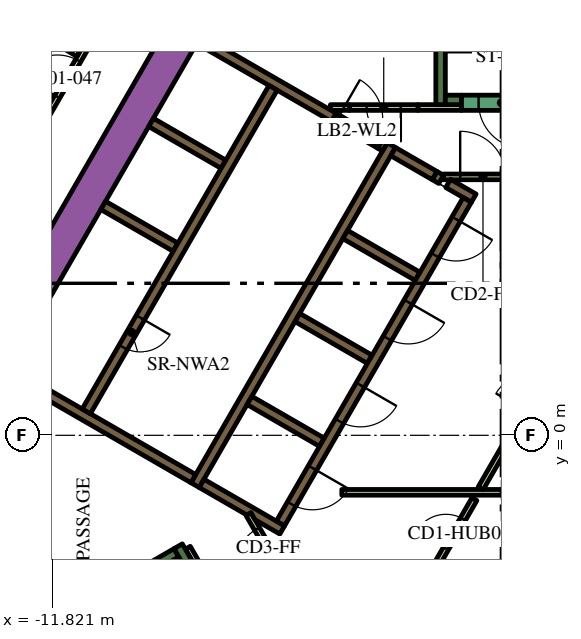
"""IFC4 building model, lengths in metres.
Left out: names, types, materials, properties, quantities, classifications, styles, units other than length and angle.
Written with IfcOpenShell. Run it as: python <this file> out.ifc"""

import sys

from ifc_helpers import new_model, si_unit, direction, frame, frame_2d, origin, place, context, subcontext, project, spatial, polyline, rectangle, outline, extrude, element, fill, save


model = new_model("IFC4")
c1 = context("Model", 3, precision=1e-05, world=origin(), true_north=direction((0.0, 1.0)))
c2 = subcontext(c1, "Body", "Model", "MODEL_VIEW")
j1 = project(units=[si_unit("LENGTHUNIT", "METRE"), si_unit("PLANEANGLEUNIT", "RADIAN")], contexts=[c1])
p1 = place(None, origin())
s1 = spatial("IfcSite", under=j1, at=p1, CompositionType="ELEMENT")
p2 = place(p1, origin())
s2 = spatial("IfcBuilding", under=s1, at=p2, CompositionType="ELEMENT")
p3 = place(p2, frame((0.0, 0.0, 27.6)))
s3 = spatial("IfcBuildingStorey", under=s2, at=p3, CompositionType="ELEMENT", Elevation=27.6)
p4 = place(p3, frame((-15.36, -1.503, 0.0), z_axis=(0.0, 0.0, 1.0), x_axis=(0.50000389221, 0.866023156604, 0.0)))
e1 = element("IfcWall", 1, at=p4, inside=s3, PredefinedType="SOLIDWALL", context=c2, shape_type="SweptSolid", body=[
    extrude(rectangle(XDim=21.0, YDim=0.9, at=frame_2d((10.5, 0.0))), origin(), (0.0, 0.0, 1.0), 3.9),
])
p5 = place(p3, frame((-1.6, 8.7, 0.0), z_axis=(0.0, 0.0, 1.0), x_axis=(0.0, 1.0, 0.0)))
e2 = element("IfcWall", 2, at=p5, inside=s3, PredefinedType="SOLIDWALL", context=c2, shape_type="SweptSolid", body=[
    extrude(rectangle(XDim=7.05, YDim=0.25, at=frame_2d((3.525, 0.0))), origin(), (0.0, 0.0, 1.0), 3.9),
])
p6 = place(p3, frame((-1.475, 8.825, 0.0), z_axis=(0.0, 0.0, 1.0), x_axis=(1.0, 0.0, 0.0)))
e3 = element("IfcWall", 3, at=p6, inside=s3, PredefinedType="SOLIDWALL", context=c2, shape_type="SweptSolid", body=[
    extrude(rectangle(XDim=0.425, YDim=0.25, at=frame_2d((0.212, 0.0))), origin(), (0.0, 0.0, 1.0), 3.9),
])
p7 = place(p3, frame((-14.44, -6.49, 0.0), z_axis=(0.0, 0.0, 1.0), x_axis=(0.866022966069, 0.500004222222, 0.0)))
e4 = element("IfcWall", 4, at=p7, inside=s3, PredefinedType="SOLIDWALL", context=c2, shape_type="SweptSolid", body=[
    extrude(rectangle(XDim=6.8, YDim=0.25, at=frame_2d((3.4, 0.0))), origin(), (0.0, 0.0, 1.0), 3.9),
])
p8 = place(p3, frame((-8.168, -3.503, 0.0), z_axis=(0.0, 0.0, 1.0), x_axis=(-0.499952099219, 0.866053057547, 0.0)))
e5 = element("IfcWall", 5, at=p8, inside=s3, PredefinedType="SOLIDWALL", context=c2, shape_type="SweptSolid", body=[
    extrude(rectangle(XDim=0.675, YDim=0.25, at=frame_2d((0.337, 0.0))), origin(), (0.0, 0.0, 1.0), 3.9),
])
p9 = place(p3, frame((-8.06, -1.311, 0.0), z_axis=(0.0, 0.0, 1.0), x_axis=(0.50000273126, 0.866023826885, 0.0)))
e6 = element("IfcWall", 6, at=p9, inside=s3, PredefinedType="SOLIDWALL", context=c2, shape_type="SweptSolid", body=[
    extrude(rectangle(XDim=10.33, YDim=0.25, at=frame_2d((5.165, 0.0))), origin(), (0.0, 0.0, 1.0), 3.9),
])
p10 = place(p3, frame((-1.758, 6.835, 0.0), z_axis=(0.0, 0.0, 1.0), x_axis=(0.865982457891, -0.500074377092, 0.0)))
e7 = element("IfcWall", 7, at=p10, inside=s3, PredefinedType="SOLIDWALL", context=c2, shape_type="SweptSolid", body=[
    extrude(rectangle(XDim=0.2, YDim=0.25, at=frame_2d((0.1, 0.0))), origin(), (0.0, 0.0, 1.0), 3.9),
])
p11 = place(p3, frame((-1.76, 6.836, 0.0), z_axis=(0.0, 0.0, 1.0), x_axis=(-0.865952863304, 0.500125622755, 0.0)))
e8 = element("IfcWall", 8, at=p11, inside=s3, PredefinedType="SOLIDWALL", context=c2, shape_type="SweptSolid", body=[
    extrude(rectangle(XDim=1.258, YDim=0.25, at=frame_2d((0.629, 0.0))), origin(), (0.0, 0.0, 1.0), 3.9),
])
p12 = place(p3, frame((-0.728, 6.24, 0.0), z_axis=(0.0, 0.0, 1.0), x_axis=(-0.865955664968, 0.500120771724, 0.0)))
e9 = element("IfcWall", 9, at=p12, inside=s3, PredefinedType="SOLIDWALL", context=c2, shape_type="SweptSolid", body=[
    extrude(rectangle(XDim=0.778, YDim=0.25, at=frame_2d((0.389, 0.0))), origin(), (0.0, 0.0, 1.0), 3.9),
])
for number, where, z_axis, x_axis in (
    (10, (-2.204, 4.182, 0.0), (0.0, 0.0, 1.0), (-0.866, 0.5, 0.0)),
    (11, (-5.369, 3.1, 0.0), (0.0, 0.0, 1.0), (0.866, -0.5, 0.0)),
    (12, (-4.724, -0.182, 0.0), (0.0, 0.0, 1.0), (-0.866, 0.5, 0.0)),
):
    element("IfcWall", number, at=place(p3, frame(where, z_axis=z_axis, x_axis=x_axis)), inside=s3, PredefinedType="SOLIDWALL", context=c2, shape_type="SweptSolid", body=[
        extrude(rectangle(XDim=2.2, YDim=0.25, at=frame_2d((1.1, 0.0))), origin(), (0.0, 0.0, 1.0), 3.9),
    ])
p13 = place(p3, origin())
e13 = element("IfcWall", 13, at=p13, inside=s3, PredefinedType="SOLIDWALL", context=c2, shape_type="SweptSolid", body=[
    extrude(outline(polyline([(-5.922, -2.257), (-5.922, -2.257), (-5.705, -2.382), (-5.83, -2.598), (-6.483, -2.221), (-6.591, -2.033), (-6.591, -2.033), (-6.7, -2.096), (-7.952, -1.373), (-7.827, -1.156), (-5.922, -2.257)])), origin(), (0.0, 0.0, 1.0), 3.9),
])
p14 = place(p3, frame((-8.106, -1.14, 0.0), z_axis=(0.0, 0.0, 1.0), x_axis=(-0.866000643155, 0.500042884217, 0.0)))
e14 = element("IfcWall", 14, at=p14, inside=s3, PredefinedType="SOLIDWALL", context=c2, shape_type="SweptSolid", body=[
    extrude(rectangle(XDim=5.65, YDim=0.25, at=frame_2d((2.825, 0.0))), origin(), (0.0, 0.0, 1.0), 3.9),
])
e15 = element("IfcWall", 15, at=p13, inside=s3, PredefinedType="SOLIDWALL", context=c2, shape_type="SweptSolid", body=[
    extrude(outline(polyline([(-3.128, 7.481), (-3.259, 7.557), (-3.134, 7.773), (-3.003, 7.698), (-3.128, 7.481)])), origin(), (0.0, 0.0, 1.0), 3.9),
])
for number, where, z_axis, x_axis in (
    (16, (-8.574, 4.95, 0.0), (0.0, 0.0, 1.0), (-0.866, 0.5, 0.0)),
    (17, (-7.314, 7.132, 0.0), (0.0, 0.0, 1.0), (-0.866, 0.5, 0.0)),
):
    element("IfcWall", number, at=place(p3, frame(where, z_axis=z_axis, x_axis=x_axis)), inside=s3, PredefinedType="SOLIDWALL", context=c2, shape_type="SweptSolid", body=[
        extrude(rectangle(XDim=2.2, YDim=0.25, at=frame_2d((1.1, 0.0))), origin(), (0.0, 0.0, 1.0), 3.9),
    ])
p15 = place(p3, frame((-7.959, 10.415, 0.0), z_axis=(0.0, 0.0, 1.0), x_axis=(0.866020958405, -0.500007699544, 0.0)))
e18 = element("IfcWall", 18, at=p15, inside=s3, PredefinedType="SOLIDWALL", context=c2, shape_type="SweptSolid", body=[
    extrude(rectangle(XDim=4.1, YDim=0.25, at=frame_2d((2.05, 0.0))), origin(), (0.0, 0.0, 1.0), 3.9),
])
p16 = place(p3, frame((-8.252, -2.958, 0.0), z_axis=(0.0, 0.0, 1.0), x_axis=(0.500174715838, -0.865924508047, 0.0)))
e19 = element("IfcWall", 19, at=p16, inside=s3, PredefinedType="PARTITIONING", context=c2, shape_type="SweptSolid", body=[
    extrude(rectangle(XDim=0.514, YDim=0.15, at=frame_2d((0.257, 0.0))), origin(), (0.0, 0.0, 1.0), 2.75),
])
p17 = place(p3, frame((-3.997, 8.625, 0.0), z_axis=(0.0, 0.0, 1.0), x_axis=(-1.0, 0.0, 0.0)))
e20 = element("IfcWall", 20, at=p17, inside=s3, PredefinedType="PARTITIONING", context=c2, shape_type="SweptSolid", body=[
    extrude(rectangle(XDim=0.502, YDim=0.15, at=frame_2d((0.251, 0.0))), origin(), (0.0, 0.0, 1.0), 2.75),
])
p18 = place(p3, frame((-2.196, 8.625, 0.0), z_axis=(0.0, 0.0, 1.0), x_axis=(1.0, 0.0, 0.0)))
e21 = element("IfcWall", 21, at=p18, inside=s3, PredefinedType="PARTITIONING", context=c2, shape_type="SweptSolid", body=[
    extrude(rectangle(XDim=1.146, YDim=0.15, at=frame_2d((0.573, 0.0))), origin(), (0.0, 0.0, 1.0), 2.75),
])
p19 = place(p3, frame((-4.2, -1.5, 0.0), z_axis=(0.0, 0.0, 1.0), x_axis=(1.0, 0.0, 0.0)))
e22 = element("IfcWall", 22, at=p19, inside=s3, PredefinedType="PARTITIONING", context=c2, shape_type="SweptSolid", body=[
    extrude(rectangle(XDim=9.359, YDim=0.15, at=frame_2d((4.68, 0.0))), origin(), (0.0, 0.0, 1.0), 2.75),
])
p20 = place(p3, frame((-0.544, -1.393, 0.0), z_axis=(0.0, 0.0, 1.0), x_axis=(0.499928740635, 0.866066541489, 0.0)))
e23 = element("IfcWall", 23, at=p20, inside=s3, PredefinedType="PARTITIONING", context=c2, shape_type="SweptSolid", body=[
    extrude(rectangle(XDim=1.912, YDim=0.15, at=frame_2d((0.956, 0.0))), origin(), (0.0, 0.0, 1.0), 2.75),
])
p21 = place(p3, frame((-6.008, 9.144, 0.0), z_axis=(0.0, 0.0, 1.0), x_axis=(-0.500006956611, -0.866021387346, 0.0)))
e24 = element("IfcWall", 24, at=p21, inside=s3, PredefinedType="SOLIDWALL", context=c2, shape_type="SweptSolid", body=[
    extrude(rectangle(XDim=9.83, YDim=0.25, at=frame_2d((4.915, 0.0))), origin(), (0.0, 0.0, 1.0), 3.9),
])
p22 = place(p21, frame((6.985, 0.0, 0.0)))
e25 = element("IfcOpeningElement", 25, at=p22, cuts=e24, PredefinedType="OPENING", context=c2, shape_type="SweptSolid", body=[
    extrude(rectangle(XDim=0.9, YDim=2.1, at=frame_2d((0.45, 1.05))), frame((0.0, 0.135, 0.0), z_axis=(0.0, -1.0, 0.0), x_axis=(1.0, 0.0, 0.0)), (0.0, 0.0, 1.0), 0.27),
])
p23 = place(p3, frame((-0.898, 6.194, 0.0), z_axis=(0.0, 0.0, 1.0), x_axis=(-0.499996202215, -0.866027596426, 0.0)))
e26 = element("IfcWall", 26, at=p23, inside=s3, PredefinedType="SOLIDWALL", context=c2, shape_type="SweptSolid", body=[
    extrude(rectangle(XDim=9.83, YDim=0.25, at=frame_2d((4.915, 0.0))), origin(), (0.0, 0.0, 1.0), 3.9),
])
p24 = place(p23, frame((0.585, 0.0, 0.0)))
e27 = element("IfcOpeningElement", 27, at=p24, cuts=e26, PredefinedType="OPENING", context=c2, shape_type="SweptSolid", body=[
    extrude(rectangle(XDim=1.1, YDim=2.1, at=frame_2d((0.55, 1.05))), frame((0.0, 0.135, 0.0), z_axis=(0.0, -1.0, 0.0), x_axis=(1.0, 0.0, 0.0)), (0.0, 0.0, 1.0), 0.27),
])
p25 = place(p23, frame((3.105, 0.0, 0.0)))
e28 = element("IfcOpeningElement", 28, at=p25, cuts=e26, PredefinedType="OPENING", context=c2, shape_type="SweptSolid", body=[
    extrude(rectangle(XDim=1.1, YDim=2.1, at=frame_2d((0.55, 1.05))), frame((0.0, 0.135, 0.0), z_axis=(0.0, -1.0, 0.0), x_axis=(1.0, 0.0, 0.0)), (0.0, 0.0, 1.0), 0.27),
])
p26 = place(p23, frame((5.625, 0.0, 0.0)))
e29 = element("IfcOpeningElement", 29, at=p26, cuts=e26, PredefinedType="OPENING", context=c2, shape_type="SweptSolid", body=[
    extrude(rectangle(XDim=1.1, YDim=2.1, at=frame_2d((0.55, 1.05))), frame((0.0, 0.135, 0.0), z_axis=(0.0, -1.0, 0.0), x_axis=(1.0, 0.0, 0.0)), (0.0, 0.0, 1.0), 0.27),
])
p27 = place(p23, frame((8.145, 0.0, 0.0)))
e30 = element("IfcOpeningElement", 30, at=p27, cuts=e26, PredefinedType="OPENING", context=c2, shape_type="SweptSolid", body=[
    extrude(rectangle(XDim=1.1, YDim=2.1, at=frame_2d((0.55, 1.05))), frame((0.0, 0.135, 0.0), z_axis=(0.0, -1.0, 0.0), x_axis=(1.0, 0.0, 0.0)), (0.0, 0.0, 1.0), 0.27),
])
p28 = place(p3, frame((1.05, 8.75, 0.0), z_axis=(0.0, 0.0, 1.0), x_axis=(-1.0, 0.0, 0.0)))
e31 = element("IfcWall", 31, at=p28, inside=s3, PredefinedType="SOLIDWALL", context=c2, shape_type="SweptSolid", body=[
    extrude(rectangle(XDim=2.1, YDim=0.4, at=frame_2d((1.05, 0.0))), origin(), (0.0, 0.0, 1.0), 3.9),
])
p29 = place(p28, frame((0.45, 0.0, 0.0)))
e32 = element("IfcOpeningElement", 32, at=p29, cuts=e31, PredefinedType="OPENING", context=c2, shape_type="SweptSolid", body=[
    extrude(rectangle(XDim=1.2, YDim=2.1, at=frame_2d((0.6, 1.05))), frame((0.0, 0.21, 0.0), z_axis=(0.0, -1.0, 0.0), x_axis=(1.0, 0.0, 0.0)), (0.0, 0.0, 1.0), 0.42),
])
p30 = place(p3, frame((-2.196, 8.625, 0.0), z_axis=(0.0, 0.0, 1.0), x_axis=(-1.0, 0.0, 0.0)))
e33 = element("IfcWall", 33, at=p30, inside=s3, PredefinedType="PARTITIONING", context=c2, shape_type="SweptSolid", body=[
    extrude(rectangle(XDim=1.8, YDim=0.15, at=frame_2d((0.9, 0.0))), origin(), (0.0, 0.0, 1.0), 2.75),
])
p31 = place(p30, frame((0.45, 0.0, 0.0)))
e34 = element("IfcOpeningElement", 34, at=p31, cuts=e33, PredefinedType="OPENING", context=c2, shape_type="SweptSolid", body=[
    extrude(rectangle(XDim=0.9, YDim=2.1, at=frame_2d((0.45, 1.05))), frame((0.0, 0.085, 0.0), z_axis=(0.0, -1.0, 0.0), x_axis=(1.0, 0.0, 0.0)), (0.0, 0.0, 1.0), 0.17),
])
p32 = place(p3, frame((-1.76, -3.498, 0.0), z_axis=(0.0, 0.0, 1.0), x_axis=(0.499977374825, 0.866038466041, 0.0)))
e35 = element("IfcWall", 35, at=p32, inside=s3, PredefinedType="PARTITIONING", context=c2, shape_type="SweptSolid", body=[
    extrude(rectangle(XDim=2.1, YDim=0.15, at=frame_2d((1.05, 0.0))), origin(), (0.0, 0.0, 1.0), 2.75),
])
p33 = place(p32, frame((0.6, 0.0, 0.0)))
e36 = element("IfcOpeningElement", 36, at=p33, cuts=e35, PredefinedType="OPENING", context=c2, shape_type="SweptSolid", body=[
    extrude(rectangle(XDim=0.9, YDim=2.1, at=frame_2d((0.45, 1.05))), frame((0.0, 0.085, 0.0), z_axis=(0.0, -1.0, 0.0), x_axis=(1.0, 0.0, 0.0)), (0.0, 0.0, 1.0), 0.17),
])
p34 = place(p3, frame((-1.534, 6.8, 0.0), z_axis=(0.0, 0.0, 1.0), x_axis=(1.0, 0.0, 0.0)))
e37 = element("IfcWall", 37, at=p34, inside=s3, PredefinedType="PARTITIONING", context=c2, shape_type="SweptSolid", body=[
    extrude(rectangle(XDim=2.1, YDim=0.15, at=frame_2d((1.05, 0.0))), origin(), (0.0, 0.0, 1.0), 2.75),
])
p35 = place(p34, frame((0.45, 0.0, 0.0)))
e38 = element("IfcOpeningElement", 38, at=p35, cuts=e37, PredefinedType="OPENING", context=c2, shape_type="SweptSolid", body=[
    extrude(rectangle(XDim=1.2, YDim=2.1, at=frame_2d((0.6, 1.05))), frame((0.0, 0.085, 0.0), z_axis=(0.0, -1.0, 0.0), x_axis=(1.0, 0.0, 0.0)), (0.0, 0.0, 1.0), 0.17),
])
p36 = place(p3, frame((-5.606, -3.89, 0.0), z_axis=(0.0, 0.0, 1.0), x_axis=(-0.500027713859, 0.866009402589, 0.0)))
e39 = element("IfcWall", 39, at=p36, inside=s3, PredefinedType="PARTITIONING", context=c2, shape_type="SweptSolid", body=[
    extrude(rectangle(XDim=2.1, YDim=0.15, at=frame_2d((1.05, 0.0))), origin(), (0.0, 0.0, 1.0), 2.75),
])
p37 = place(p36, frame((0.45, 0.0, 0.0)))
e40 = element("IfcOpeningElement", 40, at=p37, cuts=e39, PredefinedType="OPENING", context=c2, shape_type="SweptSolid", body=[
    extrude(rectangle(XDim=1.2, YDim=2.1, at=frame_2d((0.6, 1.05))), frame((0.0, 0.085, 0.0), z_axis=(0.0, -1.0, 0.0), x_axis=(1.0, 0.0, 0.0)), (0.0, 0.0, 1.0), 0.17),
])
p38 = place(p3, frame((-4.409, 8.365, 0.0), z_axis=(0.0, 0.0, 1.0), x_axis=(0.866034573852, -0.49998411664, 0.0)))
e41 = element("IfcWall", 41, at=p38, inside=s3, PredefinedType="SOLIDWALL", context=c2, shape_type="SweptSolid", body=[
    extrude(rectangle(XDim=1.4, YDim=0.25, at=frame_2d((0.7, 0.0))), origin(), (0.0, 0.0, 1.0), 3.9),
])
p39 = place(p38, frame((0.1, 0.0, 0.0)))
e42 = element("IfcOpeningElement", 42, at=p39, cuts=e41, PredefinedType="OPENING", context=c2, shape_type="SweptSolid", body=[
    extrude(rectangle(XDim=1.2, YDim=2.1, at=frame_2d((0.6, 1.05))), frame((0.0, 0.135, 0.0), z_axis=(0.0, -1.0, 0.0), x_axis=(1.0, 0.0, 0.0)), (0.0, 0.0, 1.0), 0.27),
])
p40 = place(p3, frame((-19.081, -3.9, 0.0), z_axis=(0.0, 0.0, 1.0), x_axis=(0.499998313975, 0.866026377209, 0.0)))
e43 = element("IfcWall", 43, at=p40, inside=s3, PredefinedType="PARTITIONING", context=c2, shape_type="SweptSolid", body=[
    extrude(rectangle(XDim=25.766, YDim=0.15, at=frame_2d((12.883, 0.0))), origin(), (0.0, 0.0, 1.0), 2.75),
])
p41 = place(p40, frame((24.586, 0.0, 0.0)))
e44 = element("IfcOpeningElement", 44, at=p41, cuts=e43, PredefinedType="OPENING", context=c2, shape_type="SweptSolid", body=[
    extrude(rectangle(XDim=1.0, YDim=2.1, at=frame_2d((0.5, 1.05))), frame((0.0, 0.085, 0.0), z_axis=(0.0, -1.0, 0.0), x_axis=(1.0, 0.0, 0.0)), (0.0, 0.0, 1.0), 0.17),
])
p42 = place(p40, frame((16.196, 0.0, 0.0)))
e45 = element("IfcOpeningElement", 45, at=p42, cuts=e43, PredefinedType="OPENING", context=c2, shape_type="SweptSolid", body=[
    extrude(rectangle(XDim=1.0, YDim=2.1, at=frame_2d((0.5, 1.05))), frame((0.0, 0.085, 0.0), z_axis=(0.0, -1.0, 0.0), x_axis=(1.0, 0.0, 0.0)), (0.0, 0.0, 1.0), 0.17),
])
p43 = place(p40, frame((14.789, 0.0, 0.0)))
e46 = element("IfcOpeningElement", 46, at=p43, cuts=e43, PredefinedType="OPENING", context=c2, shape_type="SweptSolid", body=[
    extrude(rectangle(XDim=1.1, YDim=2.1, at=frame_2d((0.55, 1.05))), frame((0.0, 0.085, 0.0), z_axis=(0.0, -1.0, 0.0), x_axis=(1.0, 0.0, 0.0)), (0.0, 0.0, 1.0), 0.17),
])
p44 = place(p40, frame((3.698, 0.0, 0.0)))
e47 = element("IfcOpeningElement", 47, at=p44, cuts=e43, PredefinedType="OPENING", context=c2, shape_type="SweptSolid", body=[
    extrude(rectangle(XDim=1.0, YDim=2.1, at=frame_2d((0.5, 1.05))), frame((0.0, 0.085, 0.0), z_axis=(0.0, -1.0, 0.0), x_axis=(1.0, 0.0, 0.0)), (0.0, 0.0, 1.0), 0.17),
])
p45 = place(p40, frame((1.531, 0.0, 0.0)))
e48 = element("IfcOpeningElement", 48, at=p45, cuts=e43, PredefinedType="OPENING", context=c2, shape_type="SweptSolid", body=[
    extrude(rectangle(XDim=0.9, YDim=2.1, at=frame_2d((0.45, 1.05))), frame((0.0, 0.085, 0.0), z_axis=(0.0, -1.0, 0.0), x_axis=(1.0, 0.0, 0.0)), (0.0, 0.0, 1.0), 0.17),
])
p46 = place(p3, frame((-17.856, 13.999, 0.0), z_axis=(0.0, 0.0, 1.0), x_axis=(0.861371519381, -0.507975497047, 0.0)))
e49 = element("IfcWall", 49, at=p46, inside=s3, PredefinedType="PARTITIONING", context=c2, shape_type="SweptSolid", body=[
    extrude(rectangle(XDim=7.804, YDim=0.15, at=frame_2d((3.902, 0.0))), origin(), (0.0, 0.0, 1.0), 2.75),
])
p47 = place(p22, origin())
e50 = element("IfcDoor", 50, at=p47, inside=s3, OperationType="SINGLE_SWING_LEFT", PredefinedType="DOOR", context=c2, shape_type="SweptSolid", body=[
    extrude(rectangle(XDim=0.9, YDim=2.1, at=frame_2d((0.45, 1.05))), frame((0.0, 0.025, 0.0), z_axis=(0.0, -1.0, 0.0), x_axis=(1.0, 0.0, 0.0)), (0.0, 0.0, 1.0), 0.05),
])
fill(e25, e50)
p48 = place(p24, origin())
e51 = element("IfcDoor", 51, at=p48, inside=s3, OperationType="DOUBLE_DOOR_SLIDING", PredefinedType="DOOR", context=c2, shape_type="SweptSolid", body=[
    extrude(rectangle(XDim=1.1, YDim=2.1, at=frame_2d((0.55, 1.05))), frame((0.0, 0.025, 0.0), z_axis=(0.0, -1.0, 0.0), x_axis=(1.0, 0.0, 0.0)), (0.0, 0.0, 1.0), 0.05),
])
fill(e27, e51)
p49 = place(p25, origin())
e52 = element("IfcDoor", 52, at=p49, inside=s3, OperationType="DOUBLE_DOOR_SLIDING", PredefinedType="DOOR", context=c2, shape_type="SweptSolid", body=[
    extrude(rectangle(XDim=1.1, YDim=2.1, at=frame_2d((0.55, 1.05))), frame((0.0, 0.025, 0.0), z_axis=(0.0, -1.0, 0.0), x_axis=(1.0, 0.0, 0.0)), (0.0, 0.0, 1.0), 0.05),
])
fill(e28, e52)
p50 = place(p26, origin())
e53 = element("IfcDoor", 53, at=p50, inside=s3, OperationType="DOUBLE_DOOR_SLIDING", PredefinedType="DOOR", context=c2, shape_type="SweptSolid", body=[
    extrude(rectangle(XDim=1.1, YDim=2.1, at=frame_2d((0.55, 1.05))), frame((0.0, 0.025, 0.0), z_axis=(0.0, -1.0, 0.0), x_axis=(1.0, 0.0, 0.0)), (0.0, 0.0, 1.0), 0.05),
])
fill(e29, e53)
p51 = place(p27, origin())
e54 = element("IfcDoor", 54, at=p51, inside=s3, OperationType="DOUBLE_DOOR_SLIDING", PredefinedType="DOOR", context=c2, shape_type="SweptSolid", body=[
    extrude(rectangle(XDim=1.1, YDim=2.1, at=frame_2d((0.55, 1.05))), frame((0.0, 0.025, 0.0), z_axis=(0.0, -1.0, 0.0), x_axis=(1.0, 0.0, 0.0)), (0.0, 0.0, 1.0), 0.05),
])
fill(e30, e54)
p52 = place(p29, origin())
e55 = element("IfcDoor", 55, at=p52, inside=s3, OperationType="SINGLE_SWING_LEFT", PredefinedType="DOOR", context=c2, shape_type="SweptSolid", body=[
    extrude(rectangle(XDim=1.2, YDim=2.1, at=frame_2d((0.6, 1.05))), frame((0.0, 0.025, 0.0), z_axis=(0.0, -1.0, 0.0), x_axis=(1.0, 0.0, 0.0)), (0.0, 0.0, 1.0), 0.05),
])
fill(e32, e55)
p53 = place(p31, origin())
e56 = element("IfcDoor", 56, at=p53, inside=s3, OperationType="SINGLE_SWING_LEFT", PredefinedType="DOOR", context=c2, shape_type="SweptSolid", body=[
    extrude(rectangle(XDim=0.9, YDim=2.1, at=frame_2d((0.45, 1.05))), frame((0.0, 0.025, 0.0), z_axis=(0.0, -1.0, 0.0), x_axis=(1.0, 0.0, 0.0)), (0.0, 0.0, 1.0), 0.05),
])
fill(e34, e56)
p54 = place(p33, origin())
e57 = element("IfcDoor", 57, at=p54, inside=s3, OperationType="SINGLE_SWING_LEFT", PredefinedType="DOOR", context=c2, shape_type="SweptSolid", body=[
    extrude(rectangle(XDim=0.9, YDim=2.1, at=frame_2d((0.45, 1.05))), frame((0.0, 0.025, 0.0), z_axis=(0.0, -1.0, 0.0), x_axis=(1.0, 0.0, 0.0)), (0.0, 0.0, 1.0), 0.05),
])
fill(e36, e57)
p55 = place(p35, origin())
e58 = element("IfcDoor", 58, at=p55, inside=s3, OperationType="SINGLE_SWING_LEFT", PredefinedType="DOOR", context=c2, shape_type="SweptSolid", body=[
    extrude(rectangle(XDim=1.2, YDim=2.1, at=frame_2d((0.6, 1.05))), frame((0.0, 0.025, 0.0), z_axis=(0.0, -1.0, 0.0), x_axis=(1.0, 0.0, 0.0)), (0.0, 0.0, 1.0), 0.05),
])
fill(e38, e58)
p56 = place(p37, origin())
e59 = element("IfcDoor", 59, at=p56, inside=s3, OperationType="SINGLE_SWING_LEFT", PredefinedType="DOOR", context=c2, shape_type="SweptSolid", body=[
    extrude(rectangle(XDim=1.2, YDim=2.1, at=frame_2d((0.6, 1.05))), frame((0.0, 0.025, 0.0), z_axis=(0.0, -1.0, 0.0), x_axis=(1.0, 0.0, 0.0)), (0.0, 0.0, 1.0), 0.05),
])
fill(e40, e59)
p57 = place(p39, origin())
e60 = element("IfcDoor", 60, at=p57, inside=s3, OperationType="SINGLE_SWING_LEFT", PredefinedType="DOOR", context=c2, shape_type="SweptSolid", body=[
    extrude(rectangle(XDim=1.2, YDim=2.1, at=frame_2d((0.6, 1.05))), frame((0.0, 0.025, 0.0), z_axis=(0.0, -1.0, 0.0), x_axis=(1.0, 0.0, 0.0)), (0.0, 0.0, 1.0), 0.05),
])
fill(e42, e60)
p58 = place(p43, origin())
e61 = element("IfcDoor", 61, at=p58, inside=s3, OperationType="SINGLE_SWING_RIGHT", PredefinedType="DOOR", context=c2, shape_type="SweptSolid", body=[
    extrude(rectangle(XDim=1.1, YDim=2.1, at=frame_2d((0.55, 1.05))), frame((0.0, 0.025, 0.0), z_axis=(0.0, -1.0, 0.0), x_axis=(1.0, 0.0, 0.0)), (0.0, 0.0, 1.0), 0.05),
])
fill(e46, e61)
save(model, sys.argv[1])
